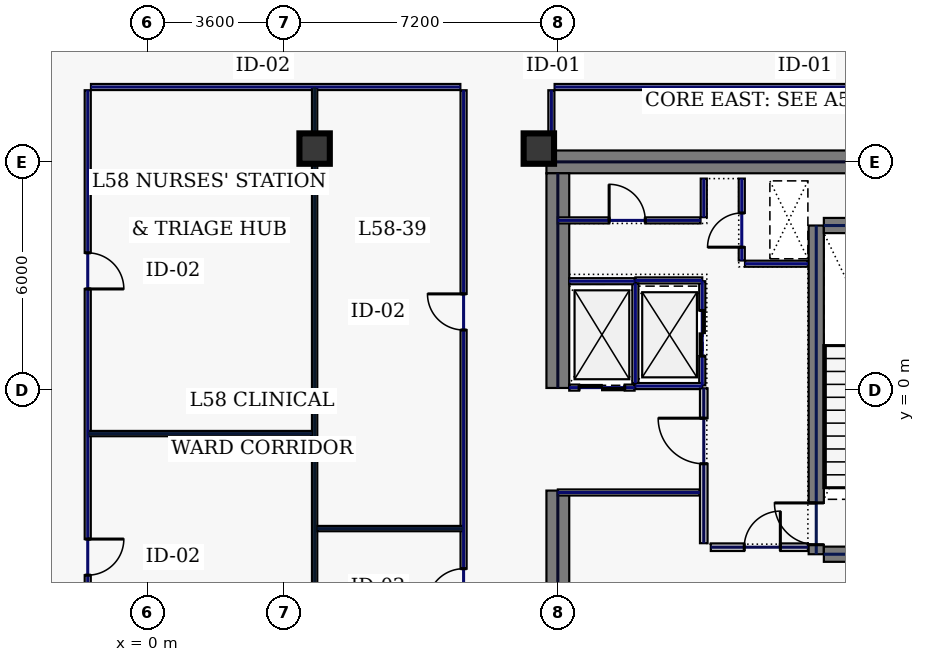
"""IFC4 building model, lengths in metres.
Left out: names, types, materials, properties, quantities, classifications, styles, units other than length and angle.
Written with IfcOpenShell. Run it as: python <this file> out.ifc"""

import sys

from ifc_helpers import new_model, si_unit, direction, frame, frame_2d, origin, origin_2d, place, context, subcontext, project, spatial, rectangle, hollow_rectangle, extrude, element, fill, save


model = new_model("IFC4")
c1 = context("Model", 3, precision=1e-05, world=origin(), true_north=direction((0.0, 1.0)))
c2 = subcontext(c1, "Body", "Model", "MODEL_VIEW")
j1 = project(units=[si_unit("LENGTHUNIT", "METRE"), si_unit("PLANEANGLEUNIT", "RADIAN")], contexts=[c1])
p1 = place(None, origin())
s1 = spatial("IfcSite", under=j1, at=p1, CompositionType="ELEMENT")
p2 = place(p1, origin())
s2 = spatial("IfcBuilding", under=s1, at=p2, CompositionType="ELEMENT")
p3 = place(p2, frame((0.0, 0.0, 251.0)))
s3 = spatial("IfcBuildingStorey", under=s2, at=p3, CompositionType="ELEMENT", Elevation=251.0)
p4 = place(p3, frame((10.5, 6.0, 0.0), z_axis=(0.0, 0.0, 1.0), x_axis=(1.0, 0.0, 0.0)))
e1 = element("IfcWall", 1, at=p4, inside=s3, PredefinedType="SHEAR", context=c2, shape_type="SweptSolid", body=[
    extrude(rectangle(XDim=11.5, YDim=0.6, at=frame_2d((5.75, 0.0))), origin(), (0.0, 0.0, 1.0), 3.74),
])
p5 = place(p3, frame((10.8, -5.7, 0.0), z_axis=(0.0, 0.0, 1.0), x_axis=(0.0, 1.0, 0.0)))
e2 = element("IfcWall", 2, at=p5, inside=s3, PredefinedType="SHEAR", context=c2, shape_type="SweptSolid", body=[
    extrude(rectangle(XDim=3.05, YDim=0.6, at=frame_2d((1.525, 0.0))), origin(), (0.0, 0.0, 1.0), 3.74),
])
p6 = place(p3, frame((10.8, 0.05, 0.0), z_axis=(0.0, 0.0, 1.0), x_axis=(0.0, 1.0, 0.0)))
e3 = element("IfcWall", 3, at=p6, inside=s3, PredefinedType="SHEAR", context=c2, shape_type="SweptSolid", body=[
    extrude(rectangle(XDim=5.65, YDim=0.6, at=frame_2d((2.825, 0.0))), origin(), (0.0, 0.0, 1.0), 3.74),
])
p7 = place(p3, frame((17.6, -4.325, 0.0), z_axis=(0.0, 0.0, 1.0), x_axis=(0.0, 1.0, 0.0)))
e4 = element("IfcWall", 4, at=p7, inside=s3, PredefinedType="SHEAR", context=c2, shape_type="SweptSolid", body=[
    extrude(rectangle(XDim=8.65, YDim=0.4, at=frame_2d((4.325, 0.0))), origin(), (0.0, 0.0, 1.0), 3.74),
])
p8 = place(p7, frame((0.25, 0.0, 0.0)))
e5 = element("IfcOpeningElement", 5, at=p8, cuts=e4, PredefinedType="OPENING", context=c2, shape_type="SweptSolid", body=[
    extrude(rectangle(XDim=1.1, YDim=2.2, at=frame_2d((0.55, 1.1))), frame((0.0, 0.21, 0.0), z_axis=(0.0, -1.0, 0.0), x_axis=(1.0, 0.0, 0.0)), (0.0, 0.0, 1.0), 0.42),
])
for number, where, z_axis, x_axis in (
    (6, (17.8, -4.325, 0.0), (0.0, 0.0, 1.0), (1.0, 0.0, 0.0)),
    (7, (17.8, 4.325, 0.0), (0.0, 0.0, 1.0), (1.0, 0.0, 0.0)),
):
    element("IfcWall", number, at=place(p3, frame(where, z_axis=z_axis, x_axis=x_axis)), inside=s3, PredefinedType="SHEAR", context=c2, shape_type="SweptSolid", body=[
        extrude(rectangle(XDim=3.4, YDim=0.4, at=frame_2d((1.7, 0.0))), origin(), (0.0, 0.0, 1.0), 3.74),
    ])
for number, where, z_axis, x_axis in (
    (8, (10.3, 6.35, 0.0), (0.0, 0.0, 1.0), (1.0, 0.0, 0.0)),
    (9, (4.4, 6.35, 0.0), (0.0, 0.0, 1.0), (1.0, 0.0, 0.0)),
):
    element("IfcColumn", number, at=place(p3, frame(where, z_axis=z_axis, x_axis=x_axis)), inside=s3, PredefinedType="COLUMN", context=c2, shape_type="SweptSolid", body=[
        extrude(hollow_rectangle(XDim=0.8, YDim=0.8, WallThickness=0.036, at=origin_2d()), origin(), (0.0, 0.0, 1.0), 3.74),
    ])
p9 = place(p3, frame((14.6, 0.12, 0.0), z_axis=(0.0, 0.0, 1.0), x_axis=(0.0, 1.0, 0.0)))
e10 = element("IfcWall", 10, at=p9, inside=s3, PredefinedType="PARTITIONING", context=c2, shape_type="SweptSolid", body=[
    extrude(rectangle(XDim=2.74, YDim=0.16, at=frame_2d((1.37, 0.0))), origin(), (0.0, 0.0, 1.0), 3.74),
])
p10 = place(p9, frame((0.77, 0.0, 0.0)))
e11 = element("IfcOpeningElement", 11, at=p10, cuts=e10, PredefinedType="OPENING", context=c2, shape_type="SweptSolid", body=[
    extrude(rectangle(XDim=1.2, YDim=2.2, at=frame_2d((0.6, 1.1))), frame((0.0, 0.09, 0.0), z_axis=(0.0, -1.0, 0.0), x_axis=(1.0, 0.0, 0.0)), (0.0, 0.0, 1.0), 0.18),
])
for number, where, z_axis, x_axis in (
    (12, (12.84, 0.1, 0.0), (0.0, 0.0, 1.0), (1.0, 0.0, 0.0)),
    (13, (12.84, 2.88, 0.0), (0.0, 0.0, 1.0), (1.0, 0.0, 0.0)),
):
    element("IfcWall", number, at=place(p3, frame(where, z_axis=z_axis, x_axis=x_axis)), inside=s3, PredefinedType="PARTITIONING", context=c2, shape_type="SweptSolid", body=[
        extrude(rectangle(XDim=1.76, YDim=0.16, at=frame_2d((0.88, 0.0))), origin(), (0.0, 0.0, 1.0), 3.74),
    ])
p11 = place(p3, frame((12.84, 0.18, 0.0), z_axis=(0.0, 0.0, 1.0), x_axis=(0.0, 1.0, 0.0)))
e14 = element("IfcWall", 14, at=p11, inside=s3, PredefinedType="PARTITIONING", context=c2, shape_type="SweptSolid", body=[
    extrude(rectangle(XDim=2.62, YDim=0.16, at=frame_2d((1.31, 0.0))), origin(), (0.0, 0.0, 1.0), 3.74),
])
p12 = place(p3, frame((11.1, 0.06, 0.0), z_axis=(0.0, 0.0, 1.0), x_axis=(1.0, 0.0, 0.0)))
e15 = element("IfcWall", 15, at=p12, inside=s3, PredefinedType="PARTITIONING", context=c2, shape_type="SweptSolid", body=[
    extrude(rectangle(XDim=1.72, YDim=0.16, at=frame_2d((0.86, 0.0))), origin(), (0.0, 0.0, 1.0), 3.74),
])
p13 = place(p12, frame((0.26, 0.0, 0.0)))
e16 = element("IfcOpeningElement", 16, at=p13, cuts=e15, PredefinedType="OPENING", context=c2, shape_type="SweptSolid", body=[
    extrude(rectangle(XDim=1.2, YDim=2.2, at=frame_2d((0.6, 1.1))), frame((0.0, 0.09, 0.0), z_axis=(0.0, -1.0, 0.0), x_axis=(1.0, 0.0, 0.0)), (0.0, 0.0, 1.0), 0.18),
])
p14 = place(p3, frame((11.1, 2.86, 0.0), z_axis=(0.0, 0.0, 1.0), x_axis=(1.0, 0.0, 0.0)))
e17 = element("IfcWall", 17, at=p14, inside=s3, PredefinedType="PARTITIONING", context=c2, shape_type="SweptSolid", body=[
    extrude(rectangle(XDim=1.72, YDim=0.16, at=frame_2d((0.86, 0.0))), origin(), (0.0, 0.0, 1.0), 3.74),
])
p15 = place(p3, frame((15.64, 3.405, 0.0), z_axis=(0.0, 0.0, 1.0), x_axis=(0.0, 1.0, 0.0)))
e18 = element("IfcWall", 18, at=p15, inside=s3, PredefinedType="PARTITIONING", context=c2, shape_type="SweptSolid", body=[
    extrude(rectangle(XDim=2.155, YDim=0.16, at=frame_2d((1.078, 0.0))), origin(), (0.0, 0.0, 1.0), 3.74),
])
p16 = place(p15, frame((0.35, 0.0, 0.0)))
e19 = element("IfcOpeningElement", 19, at=p16, cuts=e18, PredefinedType="OPENING", context=c2, shape_type="SweptSolid", body=[
    extrude(rectangle(XDim=0.9, YDim=2.2, at=frame_2d((0.45, 1.1))), frame((0.0, 0.09, 0.0), z_axis=(0.0, -1.0, 0.0), x_axis=(1.0, 0.0, 0.0)), (0.0, 0.0, 1.0), 0.18),
])
p17 = place(p3, frame((15.725, 3.32, 0.0), z_axis=(0.0, 0.0, 1.0), x_axis=(1.0, 0.0, 0.0)))
e20 = element("IfcWall", 20, at=p17, inside=s3, PredefinedType="PARTITIONING", context=c2, shape_type="SweptSolid", body=[
    extrude(rectangle(XDim=1.655, YDim=0.16, at=frame_2d((0.827, 0.0))), origin(), (0.0, 0.0, 1.0), 3.74),
])
p18 = place(p3, frame((14.825, -4.14, 0.0), z_axis=(0.0, 0.0, 1.0), x_axis=(1.0, 0.0, 0.0)))
e21 = element("IfcWall", 21, at=p18, inside=s3, PredefinedType="SOLIDWALL", context=c2, shape_type="SweptSolid", body=[
    extrude(rectangle(XDim=2.555, YDim=0.2, at=frame_2d((1.277, 0.0))), origin(), (0.0, 0.0, 1.0), 3.74),
])
p19 = place(p18, frame((0.88, 0.0, 0.0)))
e22 = element("IfcOpeningElement", 22, at=p19, cuts=e21, PredefinedType="OPENING", context=c2, shape_type="SweptSolid", body=[
    extrude(rectangle(XDim=0.95, YDim=2.2, at=frame_2d((0.475, 1.1))), frame((0.0, 0.11, 0.0), z_axis=(0.0, -1.0, 0.0), x_axis=(1.0, 0.0, 0.0)), (0.0, 0.0, 1.0), 0.22),
])
p20 = place(p3, frame((10.8, -2.7, 0.0), z_axis=(0.0, 0.0, 1.0), x_axis=(1.0, 0.0, 0.0)))
e23 = element("IfcWall", 23, at=p20, inside=s3, PredefinedType="PARTITIONING", context=c2, shape_type="SweptSolid", body=[
    extrude(rectangle(XDim=3.735, YDim=0.16, at=frame_2d((1.867, 0.0))), origin(), (0.0, 0.0, 1.0), 3.74),
])
p21 = place(p3, frame((10.8, 4.46, 0.0), z_axis=(0.0, 0.0, 1.0), x_axis=(1.0, 0.0, 0.0)))
e24 = element("IfcWall", 24, at=p21, inside=s3, PredefinedType="PARTITIONING", context=c2, shape_type="SweptSolid", body=[
    extrude(rectangle(XDim=3.755, YDim=0.16, at=frame_2d((1.877, 0.0))), origin(), (0.0, 0.0, 1.0), 3.74),
])
p22 = place(p21, frame((1.35, 0.0, 0.0)))
e25 = element("IfcOpeningElement", 25, at=p22, cuts=e24, PredefinedType="OPENING", context=c2, shape_type="SweptSolid", body=[
    extrude(rectangle(XDim=0.95, YDim=2.2, at=frame_2d((0.475, 1.1))), frame((0.0, 0.09, 0.0), z_axis=(0.0, -1.0, 0.0), x_axis=(1.0, 0.0, 0.0)), (0.0, 0.0, 1.0), 0.18),
])
p23 = place(p3, frame((14.64, 4.545, 0.0), z_axis=(0.0, 0.0, 1.0), x_axis=(0.0, 1.0, 0.0)))
e26 = element("IfcWall", 26, at=p23, inside=s3, PredefinedType="PARTITIONING", context=c2, shape_type="SweptSolid", body=[
    extrude(rectangle(XDim=1.015, YDim=0.16, at=frame_2d((0.508, 0.0))), origin(), (0.0, 0.0, 1.0), 3.74),
])
p24 = place(p3, frame((14.64, -4.035, 0.0), z_axis=(0.0, 0.0, 1.0), x_axis=(0.0, 1.0, 0.0)))
e27 = element("IfcWall", 27, at=p24, inside=s3, PredefinedType="SOLIDWALL", context=c2, shape_type="SweptSolid", body=[
    extrude(rectangle(XDim=4.075, YDim=0.2, at=frame_2d((2.038, 0.0))), origin(), (0.0, 0.0, 1.0), 3.74),
])
p25 = place(p24, frame((2.09, 0.0, 0.0)))
e28 = element("IfcOpeningElement", 28, at=p25, cuts=e27, PredefinedType="OPENING", context=c2, shape_type="SweptSolid", body=[
    extrude(rectangle(XDim=1.2, YDim=2.2, at=frame_2d((0.6, 1.1))), frame((0.0, 0.11, 0.0), z_axis=(0.0, -1.0, 0.0), x_axis=(1.0, 0.0, 0.0)), (0.0, 0.0, 1.0), 0.22),
])
p26 = place(p3, frame((22.585, 7.97, 0.0), z_axis=(0.0, 0.0, 1.0), x_axis=(-1.0, 0.0, 0.0)))
e29 = element("IfcWall", 29, at=p26, inside=s3, PredefinedType="PARTITIONING", context=c2, shape_type="SweptSolid", body=[
    extrude(rectangle(XDim=11.87, YDim=0.16, at=frame_2d((5.935, 0.0))), origin(), (0.0, 0.0, 1.0), 3.74),
])
p27 = place(p3, frame((10.63, 7.885, 0.0), z_axis=(0.0, 0.0, 1.0), x_axis=(0.0, -1.0, 0.0)))
e30 = element("IfcWall", 30, at=p27, inside=s3, PredefinedType="PARTITIONING", context=c2, shape_type="SweptSolid", body=[
    extrude(rectangle(XDim=1.465, YDim=0.16, at=frame_2d((0.732, 0.0))), origin(), (0.0, 0.0, 1.0), 3.74),
])
p28 = place(p3, frame((8.235, 7.97, 0.0), z_axis=(0.0, 0.0, 1.0), x_axis=(-1.0, 0.0, 0.0)))
e31 = element("IfcWall", 31, at=p28, inside=s3, PredefinedType="PARTITIONING", context=c2, shape_type="SweptSolid", body=[
    extrude(rectangle(XDim=9.72, YDim=0.16, at=frame_2d((4.86, 0.0))), origin(), (0.0, 0.0, 1.0), 3.74),
])
p29 = place(p3, frame((-1.57, 7.885, 0.0), z_axis=(0.0, 0.0, 1.0), x_axis=(0.0, -1.0, 0.0)))
e32 = element("IfcWall", 32, at=p29, inside=s3, PredefinedType="PARTITIONING", context=c2, shape_type="SweptSolid", body=[
    extrude(rectangle(XDim=15.67, YDim=0.16, at=frame_2d((7.835, 0.0))), origin(), (0.0, 0.0, 1.0), 3.74),
])
p30 = place(p29, frame((11.811, 0.0, 0.0)))
e33 = element("IfcOpeningElement", 33, at=p30, cuts=e32, PredefinedType="OPENING", context=c2, shape_type="SweptSolid", body=[
    extrude(rectangle(XDim=0.95, YDim=2.2, at=frame_2d((0.475, 1.1))), frame((0.0, 0.09, 0.0), z_axis=(0.0, -1.0, 0.0), x_axis=(1.0, 0.0, 0.0)), (0.0, 0.0, 1.0), 0.18),
])
p31 = place(p29, frame((4.279, 0.0, 0.0)))
e34 = element("IfcOpeningElement", 34, at=p31, cuts=e32, PredefinedType="OPENING", context=c2, shape_type="SweptSolid", body=[
    extrude(rectangle(XDim=0.95, YDim=2.2, at=frame_2d((0.475, 1.1))), frame((0.0, 0.09, 0.0), z_axis=(0.0, -1.0, 0.0), x_axis=(1.0, 0.0, 0.0)), (0.0, 0.0, 1.0), 0.18),
])
p32 = place(p3, frame((8.32, -7.785, 0.0), z_axis=(0.0, 0.0, 1.0), x_axis=(0.0, 1.0, 0.0)))
e35 = element("IfcWall", 35, at=p32, inside=s3, PredefinedType="PARTITIONING", context=c2, shape_type="SweptSolid", body=[
    extrude(rectangle(XDim=15.67, YDim=0.16, at=frame_2d((7.835, 0.0))), origin(), (0.0, 0.0, 1.0), 3.74),
])
p33 = place(p32, frame((2.129, 0.0, 0.0)))
e36 = element("IfcOpeningElement", 36, at=p33, cuts=e35, PredefinedType="OPENING", context=c2, shape_type="SweptSolid", body=[
    extrude(rectangle(XDim=0.95, YDim=2.2, at=frame_2d((0.475, 1.1))), frame((0.0, 0.09, 0.0), z_axis=(0.0, -1.0, 0.0), x_axis=(1.0, 0.0, 0.0)), (0.0, 0.0, 1.0), 0.18),
])
p34 = place(p32, frame((9.361, 0.0, 0.0)))
e37 = element("IfcOpeningElement", 37, at=p34, cuts=e35, PredefinedType="OPENING", context=c2, shape_type="SweptSolid", body=[
    extrude(rectangle(XDim=0.95, YDim=2.2, at=frame_2d((0.475, 1.1))), frame((0.0, 0.09, 0.0), z_axis=(0.0, -1.0, 0.0), x_axis=(1.0, 0.0, 0.0)), (0.0, 0.0, 1.0), 0.18),
])
p35 = place(p3, frame((4.4, -7.865, 0.0), z_axis=(0.0, 0.0, 1.0), x_axis=(0.0, 1.0, 0.0)))
e38 = element("IfcWall", 38, at=p35, inside=s3, PredefinedType="PARTITIONING", context=c2, shape_type="SweptSolid", body=[
    extrude(rectangle(XDim=15.83, YDim=0.14, at=frame_2d((7.915, 0.0))), origin(), (0.0, 0.0, 1.0), 3.035),
])
p36 = place(p3, frame((-1.565, -1.15, 0.0), z_axis=(0.0, 0.0, 1.0), x_axis=(1.0, 0.0, 0.0)))
e39 = element("IfcWall", 39, at=p36, inside=s3, PredefinedType="PARTITIONING", context=c2, shape_type="SweptSolid", body=[
    extrude(rectangle(XDim=5.89, YDim=0.14, at=frame_2d((2.945, 0.0))), origin(), (0.0, 0.0, 1.0), 3.74),
])
p37 = place(p3, frame((4.475, -3.65, 0.0), z_axis=(0.0, 0.0, 1.0), x_axis=(1.0, 0.0, 0.0)))
e40 = element("IfcWall", 40, at=p37, inside=s3, PredefinedType="PARTITIONING", context=c2, shape_type="SweptSolid", body=[
    extrude(rectangle(XDim=3.84, YDim=0.14, at=frame_2d((1.92, 0.0))), origin(), (0.0, 0.0, 1.0), 3.74),
])
p38 = place(p8, origin())
e41 = element("IfcDoor", 41, at=p38, inside=s3, OperationType="SINGLE_SWING_RIGHT", PredefinedType="DOOR", context=c2, shape_type="SweptSolid", body=[
    extrude(rectangle(XDim=1.1, YDim=2.2, at=frame_2d((0.55, 1.1))), frame((0.0, 0.025, 0.0), z_axis=(0.0, -1.0, 0.0), x_axis=(1.0, 0.0, 0.0)), (0.0, 0.0, 1.0), 0.05),
])
fill(e5, e41)
p39 = place(p10, origin())
e42 = element("IfcDoor", 42, at=p39, inside=s3, OperationType="SLIDING_TO_LEFT", PredefinedType="DOOR", context=c2, shape_type="SweptSolid", body=[
    extrude(rectangle(XDim=1.2, YDim=2.2, at=frame_2d((0.6, 1.1))), frame((0.0, 0.025, 0.0), z_axis=(0.0, -1.0, 0.0), x_axis=(1.0, 0.0, 0.0)), (0.0, 0.0, 1.0), 0.05),
])
fill(e11, e42)
p40 = place(p13, origin())
e43 = element("IfcDoor", 43, at=p40, inside=s3, OperationType="SLIDING_TO_LEFT", PredefinedType="DOOR", context=c2, shape_type="SweptSolid", body=[
    extrude(rectangle(XDim=1.2, YDim=2.2, at=frame_2d((0.6, 1.1))), frame((0.0, 0.025, 0.0), z_axis=(0.0, -1.0, 0.0), x_axis=(1.0, 0.0, 0.0)), (0.0, 0.0, 1.0), 0.05),
])
fill(e16, e43)
p41 = place(p16, origin())
e44 = element("IfcDoor", 44, at=p41, inside=s3, OperationType="SINGLE_SWING_LEFT", PredefinedType="DOOR", context=c2, shape_type="SweptSolid", body=[
    extrude(rectangle(XDim=0.9, YDim=2.2, at=frame_2d((0.45, 1.1))), frame((0.0, 0.025, 0.0), z_axis=(0.0, -1.0, 0.0), x_axis=(1.0, 0.0, 0.0)), (0.0, 0.0, 1.0), 0.05),
])
fill(e19, e44)
p42 = place(p19, origin())
e45 = element("IfcDoor", 45, at=p42, inside=s3, OperationType="SINGLE_SWING_RIGHT", PredefinedType="DOOR", context=c2, shape_type="SweptSolid", body=[
    extrude(rectangle(XDim=0.95, YDim=2.2, at=frame_2d((0.475, 1.1))), frame((0.0, 0.025, 0.0), z_axis=(0.0, -1.0, 0.0), x_axis=(1.0, 0.0, 0.0)), (0.0, 0.0, 1.0), 0.05),
])
fill(e22, e45)
p43 = place(p22, origin())
e46 = element("IfcDoor", 46, at=p43, inside=s3, OperationType="SINGLE_SWING_LEFT", PredefinedType="DOOR", context=c2, shape_type="SweptSolid", body=[
    extrude(rectangle(XDim=0.95, YDim=2.2, at=frame_2d((0.475, 1.1))), frame((0.0, 0.025, 0.0), z_axis=(0.0, -1.0, 0.0), x_axis=(1.0, 0.0, 0.0)), (0.0, 0.0, 1.0), 0.05),
])
fill(e25, e46)
p44 = place(p25, origin())
e47 = element("IfcDoor", 47, at=p44, inside=s3, OperationType="SINGLE_SWING_RIGHT", PredefinedType="DOOR", context=c2, shape_type="SweptSolid", body=[
    extrude(rectangle(XDim=1.2, YDim=2.2, at=frame_2d((0.6, 1.1))), frame((0.0, 0.025, 0.0), z_axis=(0.0, -1.0, 0.0), x_axis=(1.0, 0.0, 0.0)), (0.0, 0.0, 1.0), 0.05),
])
fill(e28, e47)
p45 = place(p30, origin())
e48 = element("IfcDoor", 48, at=p45, inside=s3, OperationType="SINGLE_SWING_LEFT", PredefinedType="DOOR", context=c2, shape_type="SweptSolid", body=[
    extrude(rectangle(XDim=0.95, YDim=2.2, at=frame_2d((0.475, 1.1))), frame((0.0, 0.025, 0.0), z_axis=(0.0, -1.0, 0.0), x_axis=(1.0, 0.0, 0.0)), (0.0, 0.0, 1.0), 0.05),
])
fill(e33, e48)
p46 = place(p31, origin())
e49 = element("IfcDoor", 49, at=p46, inside=s3, OperationType="SINGLE_SWING_RIGHT", PredefinedType="DOOR", context=c2, shape_type="SweptSolid", body=[
    extrude(rectangle(XDim=0.95, YDim=2.2, at=frame_2d((0.475, 1.1))), frame((0.0, 0.025, 0.0), z_axis=(0.0, -1.0, 0.0), x_axis=(1.0, 0.0, 0.0)), (0.0, 0.0, 1.0), 0.05),
])
fill(e34, e49)
p47 = place(p33, origin())
e50 = element("IfcDoor", 50, at=p47, inside=s3, OperationType="SINGLE_SWING_LEFT", PredefinedType="DOOR", context=c2, shape_type="SweptSolid", body=[
    extrude(rectangle(XDim=0.95, YDim=2.2, at=frame_2d((0.475, 1.1))), frame((0.0, 0.025, 0.0), z_axis=(0.0, -1.0, 0.0), x_axis=(1.0, 0.0, 0.0)), (0.0, 0.0, 1.0), 0.05),
])
fill(e36, e50)
p48 = place(p34, origin())
e51 = element("IfcDoor", 51, at=p48, inside=s3, OperationType="SINGLE_SWING_RIGHT", PredefinedType="DOOR", context=c2, shape_type="SweptSolid", body=[
    extrude(rectangle(XDim=0.95, YDim=2.2, at=frame_2d((0.475, 1.1))), frame((0.0, 0.025, 0.0), z_axis=(0.0, -1.0, 0.0), x_axis=(1.0, 0.0, 0.0)), (0.0, 0.0, 1.0), 0.05),
])
fill(e37, e51)
save(model, sys.argv[1])
